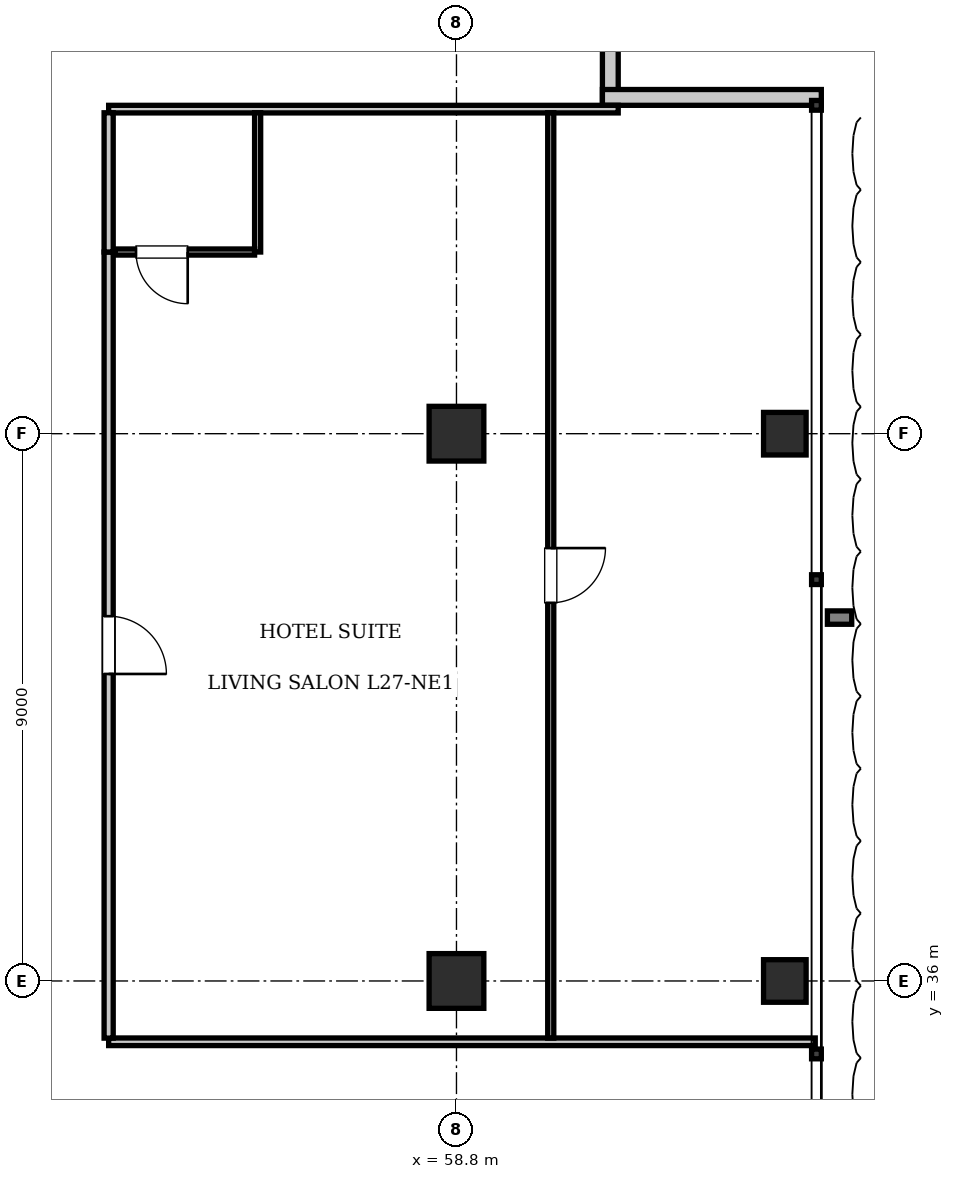
"""IFC4 building model, lengths in metres.
Left out: names, types, materials, properties, quantities, classifications, styles, units other than length and angle.
Written with IfcOpenShell. Run it as: python <this file> out.ifc"""

import sys

from ifc_helpers import new_model, si_unit, direction, frame, frame_2d, origin, origin_2d, place, context, subcontext, project, spatial, rectangle, i_section, extrude, element, fill, save


model = new_model("IFC4")
c1 = context("Model", 3, precision=1e-05, world=origin(), true_north=direction((0.0, 1.0)))
c2 = subcontext(c1, "Body", "Model", "MODEL_VIEW")
j1 = project(units=[si_unit("LENGTHUNIT", "METRE"), si_unit("PLANEANGLEUNIT", "RADIAN")], contexts=[c1])
p1 = place(None, origin())
s1 = spatial("IfcSite", under=j1, at=p1, CompositionType="ELEMENT")
p2 = place(p1, origin())
s2 = spatial("IfcBuilding", under=s1, at=p2, CompositionType="ELEMENT")
p3 = place(p2, frame((0.0, 0.0, 111.65)))
s3 = spatial("IfcBuildingStorey", under=s2, at=p3, CompositionType="ELEMENT", Elevation=111.65)
for number, where, z_axis, x_axis in (
    (1, (58.8, 36.0, 0.0), (0.0, 0.0, 1.0), (1.0, 0.0, 0.0)),
    (2, (58.8, 45.0, 0.0), (0.0, 0.0, 1.0), (1.0, 0.0, 0.0)),
):
    element("IfcColumn", number, at=place(p3, frame(where, z_axis=z_axis, x_axis=x_axis)), inside=s3, PredefinedType="COLUMN", context=c2, shape_type="SweptSolid", body=[
        extrude(rectangle(XDim=0.9, YDim=0.9, at=origin_2d()), origin(), (0.0, 0.0, 1.0), 3.85),
    ])
for number, where, z_axis, x_axis in (
    (3, (64.2, 36.0, 0.0), (0.0, 0.0, 1.0), (1.0, 0.0, 0.0)),
    (4, (64.2, 45.0, 0.0), (0.0, 0.0, 1.0), (1.0, 0.0, 0.0)),
):
    element("IfcColumn", number, at=place(p3, frame(where, z_axis=z_axis, x_axis=x_axis)), inside=s3, PredefinedType="COLUMN", context=c2, shape_type="SweptSolid", body=[
        extrude(i_section(OverallWidth=0.7, OverallDepth=0.7, WebThickness=0.028, FlangeThickness=0.044, at=origin_2d()), origin(), (0.0, 0.0, 1.0), 3.85),
    ])
for number, where, z_axis, x_axis in (
    (5, (61.33, 54.0, 0.0), (0.0, 0.0, 1.0), (0.0, -1.0, 0.0)),
    (6, (61.2, 50.53, 0.0), (0.0, 0.0, 1.0), (1.0, 0.0, 0.0)),
):
    element("IfcWall", number, at=place(p3, frame(where, z_axis=z_axis, x_axis=x_axis)), inside=s3, PredefinedType="SOLIDWALL", context=c2, shape_type="SweptSolid", body=[
        extrude(rectangle(XDim=3.6, YDim=0.26, at=frame_2d((1.8, 0.0))), origin(), (0.0, 0.0, 1.0), 3.55),
    ])
p4 = place(p3, frame((53.08, 35.0, 0.0), z_axis=(0.0, 0.0, 1.0), x_axis=(1.0, 0.0, 0.0)))
e7 = element("IfcWall", 7, at=p4, inside=s3, PredefinedType="PARTITIONING", context=c2, shape_type="SweptSolid", body=[
    extrude(rectangle(XDim=11.62, YDim=0.125, at=frame_2d((5.81, 0.0))), origin(), (0.0, 0.0, 1.0), 3.55),
])
p5 = place(p3, frame((53.08, 50.337, 0.0), z_axis=(0.0, 0.0, 1.0), x_axis=(1.0, 0.0, 0.0)))
e8 = element("IfcWall", 8, at=p5, inside=s3, PredefinedType="PARTITIONING", context=c2, shape_type="SweptSolid", body=[
    extrude(rectangle(XDim=8.38, YDim=0.125, at=frame_2d((4.19, 0.0))), origin(), (0.0, 0.0, 1.0), 3.55),
])
p6 = place(p3, frame((53.08, 35.06, 0.0), z_axis=(0.0, 0.0, 1.0), x_axis=(0.0, 1.0, 0.0)))
e9 = element("IfcWall", 9, at=p6, inside=s3, PredefinedType="PARTITIONING", context=c2, shape_type="SweptSolid", body=[
    extrude(rectangle(XDim=12.927, YDim=0.15, at=frame_2d((6.464, 0.0))), origin(), (0.0, 0.0, 1.0), 3.55),
])
p7 = place(p6, frame((5.989, 0.0, 0.0)))
e10 = element("IfcOpeningElement", 10, at=p7, cuts=e9, PredefinedType="OPENING", context=c2, shape_type="SweptSolid", body=[
    extrude(rectangle(XDim=0.95, YDim=2.15, at=frame_2d((0.475, 1.075))), frame((0.0, 0.085, 0.0), z_axis=(0.0, -1.0, 0.0), x_axis=(1.0, 0.0, 0.0)), (0.0, 0.0, 1.0), 0.17),
])
p8 = place(p3, frame((53.08, 47.988, 0.0), z_axis=(0.0, 0.0, 1.0), x_axis=(0.0, 1.0, 0.0)))
e11 = element("IfcWall", 11, at=p8, inside=s3, PredefinedType="PARTITIONING", context=c2, shape_type="SweptSolid", body=[
    extrude(rectangle(XDim=2.29, YDim=0.15, at=frame_2d((1.145, 0.0))), origin(), (0.0, 0.0, 1.0), 3.55),
])
p9 = place(p3, frame((55.53, 47.988, 0.0), z_axis=(0.0, 0.0, 1.0), x_axis=(0.0, 1.0, 0.0)))
e12 = element("IfcWall", 12, at=p9, inside=s3, PredefinedType="PARTITIONING", context=c2, shape_type="SweptSolid", body=[
    extrude(rectangle(XDim=2.29, YDim=0.1, at=frame_2d((1.145, 0.0))), origin(), (0.0, 0.0, 1.0), 3.55),
])
p10 = place(p3, frame((53.18, 47.988, 0.0), z_axis=(0.0, 0.0, 1.0), x_axis=(1.0, 0.0, 0.0)))
e13 = element("IfcWall", 13, at=p10, inside=s3, PredefinedType="PARTITIONING", context=c2, shape_type="SweptSolid", body=[
    extrude(rectangle(XDim=2.3, YDim=0.1, at=frame_2d((1.15, 0.0))), origin(), (0.0, 0.0, 1.0), 3.55),
])
p11 = place(p10, frame((0.35, 0.0, 0.0)))
e14 = element("IfcOpeningElement", 14, at=p11, cuts=e13, PredefinedType="OPENING", context=c2, shape_type="SweptSolid", body=[
    extrude(rectangle(XDim=0.85, YDim=2.1, at=frame_2d((0.425, 1.05))), frame((0.0, 0.06, 0.0), z_axis=(0.0, -1.0, 0.0), x_axis=(1.0, 0.0, 0.0)), (0.0, 0.0, 1.0), 0.12),
])
p12 = place(p3, frame((60.35, 35.06, 0.0), z_axis=(0.0, 0.0, 1.0), x_axis=(0.0, 1.0, 0.0)))
e15 = element("IfcWall", 15, at=p12, inside=s3, PredefinedType="PARTITIONING", context=c2, shape_type="SweptSolid", body=[
    extrude(rectangle(XDim=15.218, YDim=0.1, at=frame_2d((7.609, 0.0))), origin(), (0.0, 0.0, 1.0), 3.55),
])
p13 = place(p12, frame((7.159, 0.0, 0.0)))
e16 = element("IfcOpeningElement", 16, at=p13, cuts=e15, PredefinedType="OPENING", context=c2, shape_type="SweptSolid", body=[
    extrude(rectangle(XDim=0.9, YDim=2.1, at=frame_2d((0.45, 1.05))), frame((0.0, 0.06, 0.0), z_axis=(0.0, -1.0, 0.0), x_axis=(1.0, 0.0, 0.0)), (0.0, 0.0, 1.0), 0.12),
])
p14 = place(p11, frame((0.85, 0.0, 0.0), z_axis=(0.0, 0.0, 1.0), x_axis=(-1.0, 0.0, 0.0)))
e17 = element("IfcDoor", 17, at=p14, inside=s3, OperationType="SINGLE_SWING_LEFT", PredefinedType="DOOR", context=c2, shape_type="SweptSolid", body=[
    extrude(rectangle(XDim=0.85, YDim=2.1, at=frame_2d((0.425, 1.05))), frame((0.0, 0.025, 0.0), z_axis=(0.0, -1.0, 0.0), x_axis=(1.0, 0.0, 0.0)), (0.0, 0.0, 1.0), 0.05),
])
fill(e14, e17)
p15 = place(p7, frame((0.95, 0.0, 0.0), z_axis=(0.0, 0.0, 1.0), x_axis=(-1.0, 0.0, 0.0)))
e18 = element("IfcDoor", 18, at=p15, inside=s3, OperationType="SINGLE_SWING_RIGHT", PredefinedType="DOOR", context=c2, shape_type="SweptSolid", body=[
    extrude(rectangle(XDim=0.95, YDim=2.15, at=frame_2d((0.475, 1.075))), frame((0.0, 0.025, 0.0), z_axis=(0.0, -1.0, 0.0), x_axis=(1.0, 0.0, 0.0)), (0.0, 0.0, 1.0), 0.05),
])
fill(e10, e18)
p16 = place(p13, frame((0.9, 0.0, 0.0), z_axis=(0.0, 0.0, 1.0), x_axis=(-1.0, 0.0, 0.0)))
e19 = element("IfcDoor", 19, at=p16, inside=s3, OperationType="SINGLE_SWING_LEFT", PredefinedType="DOOR", context=c2, shape_type="SweptSolid", body=[
    extrude(rectangle(XDim=0.9, YDim=2.1, at=frame_2d((0.45, 1.05))), frame((0.0, 0.025, 0.0), z_axis=(0.0, -1.0, 0.0), x_axis=(1.0, 0.0, 0.0)), (0.0, 0.0, 1.0), 0.05),
])
fill(e16, e19)
save(model, sys.argv[1])
